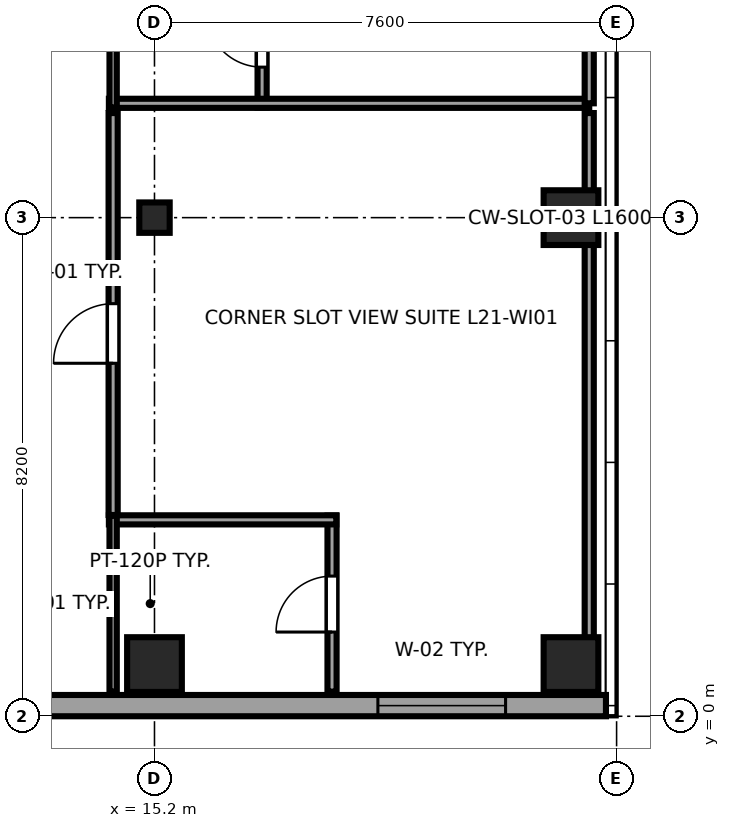
"""IFC4 building model, lengths in metres.
Left out: names, types, materials, properties, quantities, classifications, styles, units other than length and angle.
Written with IfcOpenShell. Run it as: python <this file> out.ifc"""

import sys

from ifc_helpers import new_model, si_unit, direction, frame, frame_2d, origin, origin_2d, place, context, subcontext, project, spatial, rectangle, i_section, extrude, source, transform, mapped, element, fill, save


model = new_model("IFC4")
c1 = context("Model", 3, precision=1e-05, world=origin(), true_north=direction((0.0, 1.0)))
c2 = subcontext(c1, "Body", "Model", "MODEL_VIEW")
j1 = project(units=[si_unit("LENGTHUNIT", "METRE"), si_unit("PLANEANGLEUNIT", "RADIAN")], contexts=[c1])
p1 = place(None, origin())
s1 = spatial("IfcSite", under=j1, at=p1, CompositionType="ELEMENT")
p2 = place(p1, origin())
s2 = spatial("IfcBuilding", under=s1, at=p2, CompositionType="ELEMENT")
p3 = place(p2, frame((0.0, 0.0, 85.25)))
s3 = spatial("IfcBuildingStorey", under=s2, at=p3, CompositionType="ELEMENT", Elevation=85.25)
m1 = source(origin(), c2, "Body", "SweptSolid", [
    extrude(rectangle(XDim=0.9, YDim=0.9, at=origin_2d()), origin(), (0.0, 0.0, 1.0), 3.55),
])
p4 = place(p3, frame((15.2, 0.85, 0.0), z_axis=(0.0, 0.0, 1.0), x_axis=(1.0, 0.0, 0.0)))
e1 = element("IfcColumn", 1, at=p4, inside=s3, PredefinedType="COLUMN", context=c2, shape_type="MappedRepresentation", body=[
    mapped(m1, transform((0.0, 0.0, 0.0), x_axis=(1.0, 0.0, 0.0), y_axis=(0.0, 1.0, 0.0), z_axis=(0.0, 0.0, 1.0), scale=1.0)),
])
m2 = source(origin(), c2, "Body", "SweptSolid", [
    extrude(i_section(OverallWidth=0.5, OverallDepth=0.5, WebThickness=0.022, FlangeThickness=0.034, at=origin_2d()), origin(), (0.0, 0.0, 1.0), 3.55),
])
p5 = place(p3, frame((15.2, 8.2, 0.0), z_axis=(0.0, 0.0, 1.0), x_axis=(1.0, 0.0, 0.0)))
e2 = element("IfcColumn", 2, at=p5, inside=s3, PredefinedType="COLUMN", context=c2, shape_type="MappedRepresentation", body=[
    mapped(m2, transform((0.0, 0.0, 0.0), x_axis=(1.0, 0.0, 0.0), y_axis=(0.0, 1.0, 0.0), z_axis=(0.0, 0.0, 1.0), scale=1.0)),
])
for number, where, z_axis, x_axis in (
    (3, (22.05, 0.85, 0.0), (0.0, 0.0, 1.0), (1.0, 0.0, 0.0)),
    (4, (22.05, 8.2, 0.0), (0.0, 0.0, 1.0), (1.0, 0.0, 0.0)),
):
    element("IfcColumn", number, at=place(p3, frame(where, z_axis=z_axis, x_axis=x_axis)), inside=s3, PredefinedType="COLUMN", context=c2, shape_type="MappedRepresentation", body=[
        mapped(m1, transform((0.0, 0.0, 0.0), x_axis=(1.0, 0.0, 0.0), y_axis=(0.0, 1.0, 0.0), z_axis=(0.0, 0.0, 1.0), scale=1.0)),
    ])
p6 = place(p3, frame((4.617, 0.175, 0.0), z_axis=(0.0, 0.0, 1.0), x_axis=(1.0, 0.0, 0.0)))
e5 = element("IfcWall", 5, at=p6, inside=s3, PredefinedType="SOLIDWALL", context=c2, shape_type="SweptSolid", body=[
    extrude(rectangle(XDim=18.008, YDim=0.35, at=frame_2d((9.004, 0.0))), origin(), (0.0, 0.0, 1.0), 3.37),
])
p7 = place(p6, frame((5.303, 0.0, 0.68)))
e6 = element("IfcOpeningElement", 6, at=p7, cuts=e5, PredefinedType="OPENING", context=c2, shape_type="SweptSolid", body=[
    extrude(rectangle(XDim=2.1, YDim=1.9, at=frame_2d((1.05, 0.95))), frame((0.0, 0.185, 0.0), z_axis=(0.0, -1.0, 0.0), x_axis=(1.0, 0.0, 0.0)), (0.0, 0.0, 1.0), 0.37),
])
p8 = place(p6, frame((14.257, 0.0, 0.68)))
e7 = element("IfcOpeningElement", 7, at=p8, cuts=e5, PredefinedType="OPENING", context=c2, shape_type="SweptSolid", body=[
    extrude(rectangle(XDim=2.1, YDim=1.9, at=frame_2d((1.05, 0.95))), frame((0.0, 0.185, 0.0), z_axis=(0.0, -1.0, 0.0), x_axis=(1.0, 0.0, 0.0)), (0.0, 0.0, 1.0), 0.37),
])
p9 = place(p3, frame((18.12, 0.405, 0.0), z_axis=(0.0, 0.0, 1.0), x_axis=(0.0, 1.0, 0.0)))
e8 = element("IfcWall", 8, at=p9, inside=s3, PredefinedType="PARTITIONING", context=c2, shape_type="SweptSolid", body=[
    extrude(rectangle(XDim=2.895, YDim=0.15, at=frame_2d((1.448, 0.0))), origin(), (0.0, 0.0, 1.0), 3.37),
])
p10 = place(p9, frame((0.98, 0.0, 0.0)))
e9 = element("IfcOpeningElement", 9, at=p10, cuts=e8, PredefinedType="OPENING", context=c2, shape_type="SweptSolid", body=[
    extrude(rectangle(XDim=0.92, YDim=2.01, at=frame_2d((0.46, 1.005))), frame((0.0, 0.085, 0.0), z_axis=(0.0, -1.0, 0.0), x_axis=(1.0, 0.0, 0.0)), (0.0, 0.0, 1.0), 0.17),
])
p11 = place(p3, frame((14.45, 3.23, 0.0), z_axis=(0.0, 0.0, 1.0), x_axis=(1.0, 0.0, 0.0)))
e10 = element("IfcWall", 10, at=p11, inside=s3, PredefinedType="PARTITIONING", context=c2, shape_type="SweptSolid", body=[
    extrude(rectangle(XDim=3.74, YDim=0.15, at=frame_2d((1.87, 0.0))), origin(), (0.0, 0.0, 1.0), 3.37),
])
p12 = place(p3, frame((14.52, 0.405, 0.0), z_axis=(0.0, 0.0, 1.0), x_axis=(0.0, 1.0, 0.0)))
e11 = element("IfcWall", 11, at=p12, inside=s3, PredefinedType="PLUMBINGWALL", context=c2, shape_type="SweptSolid", body=[
    extrude(rectangle(XDim=2.895, YDim=0.12, at=frame_2d((1.448, 0.0))), origin(), (0.0, 0.0, 1.0), 3.37),
])
p13 = place(p3, frame((16.97, 10.01, 0.0), z_axis=(0.0, 0.0, 1.0), x_axis=(0.0, 1.0, 0.0)))
e12 = element("IfcWall", 12, at=p13, inside=s3, PredefinedType="PARTITIONING", context=c2, shape_type="SweptSolid", body=[
    extrude(rectangle(XDim=2.39, YDim=0.15, at=frame_2d((1.195, 0.0))), origin(), (0.0, 0.0, 1.0), 3.37),
])
p14 = place(p13, frame((0.665, 0.0, 0.0)))
e13 = element("IfcOpeningElement", 13, at=p14, cuts=e12, PredefinedType="OPENING", context=c2, shape_type="SweptSolid", body=[
    extrude(rectangle(XDim=0.92, YDim=2.01, at=frame_2d((0.46, 1.005))), frame((0.0, 0.085, 0.0), z_axis=(0.0, -1.0, 0.0), x_axis=(1.0, 0.0, 0.0)), (0.0, 0.0, 1.0), 0.17),
])
p15 = place(p3, frame((14.45, 10.08, 0.0), z_axis=(0.0, 0.0, 1.0), x_axis=(1.0, 0.0, 0.0)))
e14 = element("IfcWall", 14, at=p15, inside=s3, PredefinedType="PARTITIONING", context=c2, shape_type="SweptSolid", body=[
    extrude(rectangle(XDim=7.9, YDim=0.15, at=frame_2d((3.95, 0.0))), origin(), (0.0, 0.0, 1.0), 3.37),
])
p16 = place(p3, frame((14.52, 10.01, 0.0), z_axis=(0.0, 0.0, 1.0), x_axis=(0.0, 1.0, 0.0)))
e15 = element("IfcWall", 15, at=p16, inside=s3, PredefinedType="PLUMBINGWALL", context=c2, shape_type="SweptSolid", body=[
    extrude(rectangle(XDim=2.39, YDim=0.12, at=frame_2d((1.195, 0.0))), origin(), (0.0, 0.0, 1.0), 3.37),
])
p17 = place(p3, frame((14.52, 3.31, 0.0), z_axis=(0.0, 0.0, 1.0), x_axis=(0.0, 1.0, 0.0)))
e16 = element("IfcWall", 16, at=p17, inside=s3, PredefinedType="PARTITIONING", context=c2, shape_type="SweptSolid", body=[
    extrude(rectangle(XDim=6.61, YDim=0.15, at=frame_2d((3.305, 0.0))), origin(), (0.0, 0.0, 1.0), 3.37),
])
p18 = place(p17, frame((2.495, 0.0, 0.0)))
e17 = element("IfcOpeningElement", 17, at=p18, cuts=e16, PredefinedType="OPENING", context=c2, shape_type="SweptSolid", body=[
    extrude(rectangle(XDim=0.98, YDim=2.12, at=frame_2d((0.49, 1.06))), frame((0.0, 0.085, 0.0), z_axis=(0.0, -1.0, 0.0), x_axis=(1.0, 0.0, 0.0)), (0.0, 0.0, 1.0), 0.17),
])
p19 = place(p3, frame((22.35, 0.405, 0.0), z_axis=(0.0, 0.0, 1.0), x_axis=(0.0, 1.0, 0.0)))
e18 = element("IfcWall", 18, at=p19, inside=s3, PredefinedType="PARTITIONING", context=c2, shape_type="SweptSolid", body=[
    extrude(rectangle(XDim=9.515, YDim=0.15, at=frame_2d((4.757, 0.0))), origin(), (0.0, 0.0, 1.0), 3.37),
])
p20 = place(p3, frame((22.35, 10.08, 0.0), z_axis=(0.0, 0.0, 1.0), x_axis=(0.0, 1.0, 0.0)))
e19 = element("IfcWall", 19, at=p20, inside=s3, PredefinedType="PARTITIONING", context=c2, shape_type="SweptSolid", body=[
    extrude(rectangle(XDim=9.74, YDim=0.15, at=frame_2d((4.87, 0.0))), origin(), (0.0, 0.0, 1.0), 3.37),
])
m3 = source(origin(), c2, "Body", "SweptSolid", [
    extrude(rectangle(XDim=2.1, YDim=1.9, at=frame_2d((1.05, 0.95))), frame((0.0, 0.09, 0.0), z_axis=(0.0, -1.0, 0.0), x_axis=(1.0, 0.0, 0.0)), (0.0, 0.0, 1.0), 0.06),
])
p21 = place(p8, origin())
e20 = element("IfcWindow", 20, at=p21, inside=s3, PartitioningType="TRIPLE_PANEL_HORIZONTAL", PredefinedType="WINDOW", context=c2, shape_type="MappedRepresentation", body=[
    mapped(m3, transform((0.0, 0.0, 0.0), x_axis=(1.0, 0.0, 0.0), y_axis=(0.0, 1.0, 0.0), z_axis=(0.0, 0.0, 1.0), scale=1.0)),
])
fill(e7, e20)
m4 = source(origin(), c2, "Body", "SweptSolid", [
    extrude(rectangle(XDim=0.92, YDim=2.01, at=frame_2d((0.46, 1.005))), frame((0.0, 0.025, 0.0), z_axis=(0.0, -1.0, 0.0), x_axis=(1.0, 0.0, 0.0)), (0.0, 0.0, 1.0), 0.05),
])
p22 = place(p10, origin())
e21 = element("IfcDoor", 21, at=p22, inside=s3, OperationType="SINGLE_SWING_LEFT", PredefinedType="DOOR", context=c2, shape_type="MappedRepresentation", body=[
    mapped(m4, transform((0.0, 0.0, 0.0), x_axis=(1.0, 0.0, 0.0), y_axis=(0.0, 1.0, 0.0), z_axis=(0.0, 0.0, 1.0), scale=1.0)),
])
fill(e9, e21)
p23 = place(p14, origin())
e22 = element("IfcDoor", 22, at=p23, inside=s3, OperationType="SINGLE_SWING_RIGHT", PredefinedType="DOOR", context=c2, shape_type="MappedRepresentation", body=[
    mapped(m4, transform((0.0, 0.0, 0.0), x_axis=(1.0, 0.0, 0.0), y_axis=(0.0, 1.0, 0.0), z_axis=(0.0, 0.0, 1.0), scale=1.0)),
])
fill(e13, e22)
m5 = source(origin(), c2, "Body", "SweptSolid", [
    extrude(rectangle(XDim=0.98, YDim=2.12, at=frame_2d((0.49, 1.06))), frame((0.0, 0.025, 0.0), z_axis=(0.0, -1.0, 0.0), x_axis=(1.0, 0.0, 0.0)), (0.0, 0.0, 1.0), 0.05),
])
p24 = place(p18, origin())
e23 = element("IfcDoor", 23, at=p24, inside=s3, OperationType="SINGLE_SWING_LEFT", PredefinedType="DOOR", context=c2, shape_type="MappedRepresentation", body=[
    mapped(m5, transform((0.0, 0.0, 0.0), x_axis=(1.0, 0.0, 0.0), y_axis=(0.0, 1.0, 0.0), z_axis=(0.0, 0.0, 1.0), scale=1.0)),
])
fill(e17, e23)
save(model, sys.argv[1])
